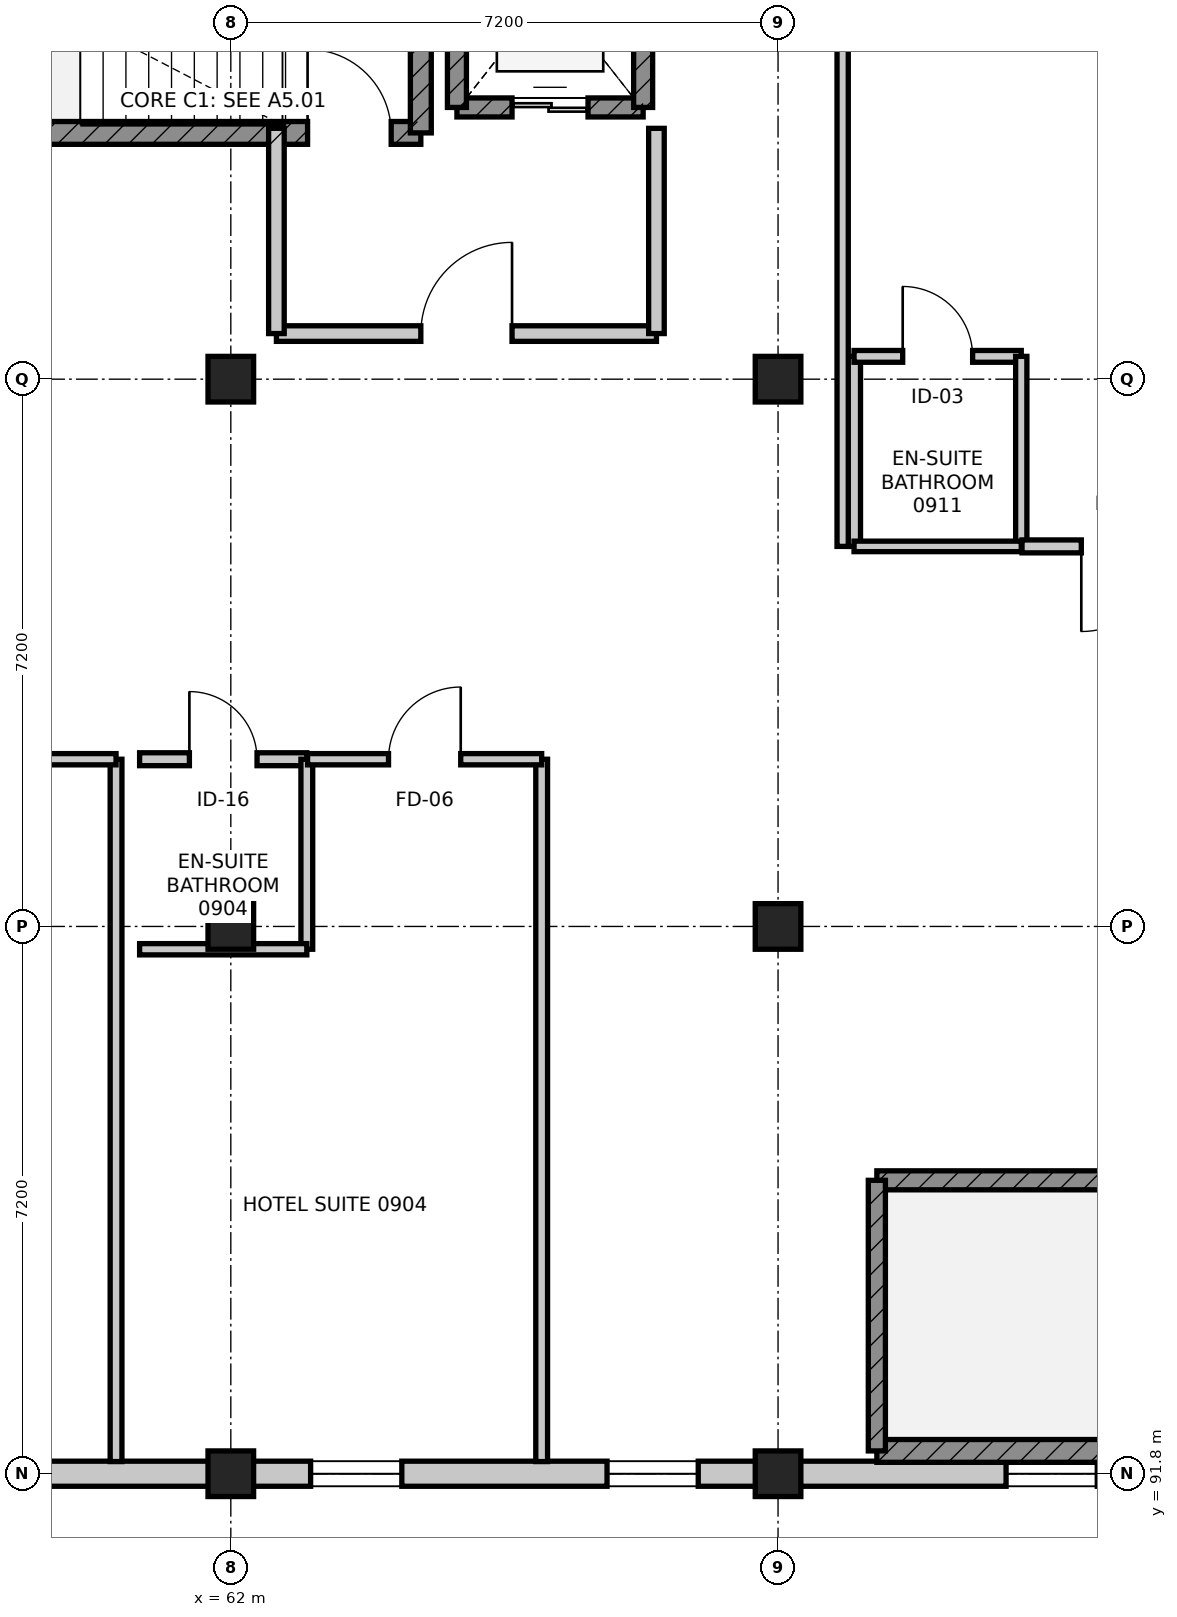
"""IFC4 building model, lengths in metres.
Left out: names, types, materials, properties, quantities, classifications, styles, units other than length and angle.
Written with IfcOpenShell. Run it as: python <this file> out.ifc"""

import sys

from ifc_helpers import new_model, si_unit, direction, frame, frame_2d, origin, origin_2d, place, context, subcontext, project, spatial, rectangle, extrude, element, fill, save


model = new_model("IFC4")
c1 = context("Model", 3, precision=1e-05, world=origin(), true_north=direction((0.0, 1.0)))
c2 = subcontext(c1, "Body", "Model", "MODEL_VIEW")
j1 = project(units=[si_unit("LENGTHUNIT", "METRE"), si_unit("PLANEANGLEUNIT", "RADIAN")], contexts=[c1])
p1 = place(None, origin())
s1 = spatial("IfcSite", under=j1, at=p1, CompositionType="ELEMENT")
p2 = place(p1, origin())
s2 = spatial("IfcBuilding", under=s1, at=p2, CompositionType="ELEMENT")
p3 = place(p2, frame((0.0, 0.0, 37.2)))
s3 = spatial("IfcBuildingStorey", under=s2, at=p3, CompositionType="ELEMENT", Elevation=37.2)
for number, where, z_axis, x_axis in (
    (1, (62.0, 91.8, 0.0), (0.0, 0.0, 1.0), (1.0, 0.0, 0.0)),
    (2, (62.0, 99.0, 0.0), (0.0, 0.0, 1.0), (1.0, 0.0, 0.0)),
    (3, (62.0, 106.2, 0.0), (0.0, 0.0, 1.0), (1.0, 0.0, 0.0)),
    (4, (69.2, 91.8, 0.0), (0.0, 0.0, 1.0), (1.0, 0.0, 0.0)),
    (5, (69.2, 99.0, 0.0), (0.0, 0.0, 1.0), (1.0, 0.0, 0.0)),
    (6, (69.2, 106.2, 0.0), (0.0, 0.0, 1.0), (1.0, 0.0, 0.0)),
):
    element("IfcColumn", number, at=place(p3, frame(where, z_axis=z_axis, x_axis=x_axis)), inside=s3, PredefinedType="COLUMN", context=c2, shape_type="SweptSolid", body=[
        extrude(rectangle(XDim=0.6, YDim=0.6, at=origin_2d()), origin(), (0.0, 0.0, 1.0), 3.6),
    ])
p4 = place(p3, frame((76.4, 91.8, 0.0), z_axis=(0.0, 0.0, 1.0), x_axis=(-1.0, 0.0, 0.0)))
e7 = element("IfcWall", 7, at=p4, inside=s3, PredefinedType="STANDARD", context=c2, shape_type="SweptSolid", body=[
    extrude(rectangle(XDim=7.2, YDim=0.33, at=frame_2d((3.6, 0.0))), origin(), (0.0, 0.0, 1.0), 3.38),
])
p5 = place(p4, frame((3.0, 0.0, 0.9)))
e8 = element("IfcOpeningElement", 8, at=p5, cuts=e7, PredefinedType="OPENING", context=c2, shape_type="SweptSolid", body=[
    extrude(rectangle(XDim=1.2, YDim=2.1, at=frame_2d((0.6, 1.05))), frame((0.0, 0.175, 0.0), z_axis=(0.0, -1.0, 0.0), x_axis=(1.0, 0.0, 0.0)), (0.0, 0.0, 1.0), 0.35),
])
p6 = place(p4, frame((1.05, 0.0, 0.85)))
e9 = element("IfcOpeningElement", 9, at=p6, cuts=e7, PredefinedType="OPENING", context=c2, shape_type="SweptSolid", body=[
    extrude(rectangle(XDim=1.2, YDim=1.8, at=frame_2d((0.6, 0.9))), frame((0.0, 0.175, 0.0), z_axis=(0.0, -1.0, 0.0), x_axis=(1.0, 0.0, 0.0)), (0.0, 0.0, 1.0), 0.35),
])
p7 = place(p3, frame((69.2, 91.8, 0.0), z_axis=(0.0, 0.0, 1.0), x_axis=(-1.0, 0.0, 0.0)))
e10 = element("IfcWall", 10, at=p7, inside=s3, PredefinedType="STANDARD", context=c2, shape_type="SweptSolid", body=[
    extrude(rectangle(XDim=7.2, YDim=0.33, at=frame_2d((3.6, 0.0))), origin(), (0.0, 0.0, 1.0), 2.765),
])
p8 = place(p7, frame((1.05, 0.0, 0.85)))
e11 = element("IfcOpeningElement", 11, at=p8, cuts=e10, PredefinedType="OPENING", context=c2, shape_type="SweptSolid", body=[
    extrude(rectangle(XDim=1.2, YDim=1.8, at=frame_2d((0.6, 0.9))), frame((0.0, 0.175, 0.0), z_axis=(0.0, -1.0, 0.0), x_axis=(1.0, 0.0, 0.0)), (0.0, 0.0, 1.0), 0.35),
])
p9 = place(p7, frame((4.95, 0.0, 0.85)))
e12 = element("IfcOpeningElement", 12, at=p9, cuts=e10, PredefinedType="OPENING", context=c2, shape_type="SweptSolid", body=[
    extrude(rectangle(XDim=1.2, YDim=1.8, at=frame_2d((0.6, 0.9))), frame((0.0, 0.175, 0.0), z_axis=(0.0, -1.0, 0.0), x_axis=(1.0, 0.0, 0.0)), (0.0, 0.0, 1.0), 0.35),
])
p10 = place(p3, frame((62.0, 91.8, 0.0), z_axis=(0.0, 0.0, 1.0), x_axis=(-1.0, 0.0, 0.0)))
e13 = element("IfcWall", 13, at=p10, inside=s3, PredefinedType="STANDARD", context=c2, shape_type="SweptSolid", body=[
    extrude(rectangle(XDim=7.2, YDim=0.33, at=frame_2d((3.6, 0.0))), origin(), (0.0, 0.0, 1.0), 2.765),
])
p11 = place(p10, frame((2.85, 0.0, 0.75)))
e14 = element("IfcOpeningElement", 14, at=p11, cuts=e13, PredefinedType="OPENING", context=c2, shape_type="SweptSolid", body=[
    extrude(rectangle(XDim=1.5, YDim=1.5, at=frame_2d((0.75, 0.75))), frame((0.0, 0.175, 0.0), z_axis=(0.0, -1.0, 0.0), x_axis=(1.0, 0.0, 0.0)), (0.0, 0.0, 1.0), 0.35),
])
p12 = place(p10, frame((4.95, 0.0, 0.85)))
e15 = element("IfcOpeningElement", 15, at=p12, cuts=e13, PredefinedType="OPENING", context=c2, shape_type="SweptSolid", body=[
    extrude(rectangle(XDim=1.2, YDim=1.8, at=frame_2d((0.6, 0.9))), frame((0.0, 0.175, 0.0), z_axis=(0.0, -1.0, 0.0), x_axis=(1.0, 0.0, 0.0)), (0.0, 0.0, 1.0), 0.35),
])
p13 = place(p3, frame((56.1, 109.44, 0.0), z_axis=(0.0, 0.0, 1.0), x_axis=(1.0, 0.0, 0.0)))
e16 = element("IfcWall", 16, at=p13, inside=s3, PredefinedType="SHEAR", context=c2, shape_type="SweptSolid", body=[
    extrude(rectangle(XDim=8.4, YDim=0.3, at=frame_2d((4.2, 0.0))), origin(), (0.0, 0.0, 1.0), 3.38),
])
p14 = place(p13, frame((6.91, 0.0, 0.0)))
e17 = element("IfcOpeningElement", 17, at=p14, cuts=e16, PredefinedType="OPENING", context=c2, shape_type="SweptSolid", body=[
    extrude(rectangle(XDim=1.1, YDim=2.1, at=frame_2d((0.55, 1.05))), frame((0.0, 0.16, 0.0), z_axis=(0.0, -1.0, 0.0), x_axis=(1.0, 0.0, 0.0)), (0.0, 0.0, 1.0), 0.32),
])
p15 = place(p3, frame((64.5, 109.44, 0.0), z_axis=(0.0, 0.0, 1.0), x_axis=(0.0, 1.0, 0.0)))
e18 = element("IfcWall", 18, at=p15, inside=s3, PredefinedType="SHEAR", context=c2, shape_type="SweptSolid", body=[
    extrude(rectangle(XDim=3.56, YDim=0.275, at=frame_2d((1.78, 0.0))), origin(), (0.0, 0.0, 1.0), 3.38),
])
p16 = place(p3, frame((70.5, 92.1, 0.0), z_axis=(0.0, 0.0, 1.0), x_axis=(1.0, 0.0, 0.0)))
e19 = element("IfcWall", 19, at=p16, inside=s3, PredefinedType="SHEAR", context=c2, shape_type="SweptSolid", body=[
    extrude(rectangle(XDim=8.4, YDim=0.3, at=frame_2d((4.2, 0.0))), origin(), (0.0, 0.0, 1.0), 3.38),
])
p17 = place(p3, frame((78.9, 95.66, 0.0), z_axis=(0.0, 0.0, 1.0), x_axis=(-1.0, 0.0, 0.0)))
e20 = element("IfcWall", 20, at=p17, inside=s3, PredefinedType="SHEAR", context=c2, shape_type="SweptSolid", body=[
    extrude(rectangle(XDim=8.4, YDim=0.25, at=frame_2d((4.2, 0.0))), origin(), (0.0, 0.0, 1.0), 3.38),
])
p18 = place(p17, frame((0.39, 0.0, 0.0)))
e21 = element("IfcOpeningElement", 21, at=p18, cuts=e20, PredefinedType="OPENING", context=c2, shape_type="SweptSolid", body=[
    extrude(rectangle(XDim=1.1, YDim=2.1, at=frame_2d((0.55, 1.05))), frame((0.0, 0.135, 0.0), z_axis=(0.0, -1.0, 0.0), x_axis=(1.0, 0.0, 0.0)), (0.0, 0.0, 1.0), 0.27),
])
p19 = place(p3, frame((70.5, 95.66, 0.0), z_axis=(0.0, 0.0, 1.0), x_axis=(0.0, -1.0, 0.0)))
e22 = element("IfcWall", 22, at=p19, inside=s3, PredefinedType="SHEAR", context=c2, shape_type="SweptSolid", body=[
    extrude(rectangle(XDim=3.56, YDim=0.225, at=frame_2d((1.78, 0.0))), origin(), (0.0, 0.0, 1.0), 3.38),
])
p20 = place(p3, frame((64.975, 109.775, 0.0), z_axis=(0.0, 0.0, 1.0), x_axis=(1.0, 0.0, 0.0)))
e23 = element("IfcWall", 23, at=p20, inside=s3, PredefinedType="SHEAR", context=c2, shape_type="SweptSolid", body=[
    extrude(rectangle(XDim=2.45, YDim=0.25, at=frame_2d((1.225, 0.0))), origin(), (0.0, 0.0, 1.0), 3.38),
])
p21 = place(p20, frame((0.725, 0.0, 0.0)))
e24 = element("IfcOpeningElement", 24, at=p21, cuts=e23, PredefinedType="OPENING", context=c2, shape_type="SweptSolid", body=[
    extrude(rectangle(XDim=1.0, YDim=2.15, at=frame_2d((0.5, 1.075))), frame((0.0, 0.135, 0.0), z_axis=(0.0, -1.0, 0.0), x_axis=(1.0, 0.0, 0.0)), (0.0, 0.0, 1.0), 0.27),
])
for number, where, z_axis, x_axis in (
    (25, (67.425, 109.775, 0.0), (0.0, 0.0, 1.0), (0.0, 1.0, 0.0)),
    (26, (64.975, 112.825, 0.0), (0.0, 0.0, 1.0), (0.0, -1.0, 0.0)),
):
    element("IfcWall", number, at=place(p3, frame(where, z_axis=z_axis, x_axis=x_axis)), inside=s3, PredefinedType="SHEAR", context=c2, shape_type="SweptSolid", body=[
        extrude(rectangle(XDim=3.05, YDim=0.25, at=frame_2d((1.525, 0.0))), origin(), (0.0, 0.0, 1.0), 3.38),
    ])
p22 = place(p3, frame((62.6, 106.8, 0.0), z_axis=(0.0, 0.0, 1.0), x_axis=(1.0, 0.0, 0.0)))
e27 = element("IfcWall", 27, at=p22, inside=s3, PredefinedType="PARTITIONING", context=c2, shape_type="SweptSolid", body=[
    extrude(rectangle(XDim=5.0, YDim=0.205, at=frame_2d((2.5, 0.0))), origin(), (0.0, 0.0, 1.0), 3.38),
])
p23 = place(p22, frame((1.9, 0.0, 0.0)))
e28 = element("IfcOpeningElement", 28, at=p23, cuts=e27, PredefinedType="OPENING", context=c2, shape_type="SweptSolid", body=[
    extrude(rectangle(XDim=1.2, YDim=2.1, at=frame_2d((0.6, 1.05))), frame((0.0, 0.113, 0.0), z_axis=(0.0, -1.0, 0.0), x_axis=(1.0, 0.0, 0.0)), (0.0, 0.0, 1.0), 0.225),
])
for number, where, z_axis, x_axis in (
    (29, (67.6, 106.8, 0.0), (0.0, 0.0, 1.0), (0.0, 1.0, 0.0)),
    (30, (62.6, 109.5, 0.0), (0.0, 0.0, 1.0), (0.0, -1.0, 0.0)),
):
    element("IfcWall", number, at=place(p3, frame(where, z_axis=z_axis, x_axis=x_axis)), inside=s3, PredefinedType="PARTITIONING", context=c2, shape_type="SweptSolid", body=[
        extrude(rectangle(XDim=2.7, YDim=0.205, at=frame_2d((1.35, 0.0))), origin(), (0.0, 0.0, 1.0), 3.38),
    ])
p24 = place(p3, frame((60.49, 101.2, 0.0), z_axis=(0.0, 0.0, 1.0), x_axis=(0.0, -1.0, 0.0)))
e31 = element("IfcWall", 31, at=p24, inside=s3, PredefinedType="PARTITIONING", context=c2, shape_type="SweptSolid", body=[
    extrude(rectangle(XDim=9.24, YDim=0.155, at=frame_2d((4.62, 0.0))), origin(), (0.0, 0.0, 1.0), 2.765),
])
p25 = place(p3, frame((57.41, 101.2, 0.0), z_axis=(0.0, 0.0, 1.0), x_axis=(1.0, 0.0, 0.0)))
e32 = element("IfcWall", 32, at=p25, inside=s3, PredefinedType="PARTITIONING", context=c2, shape_type="SweptSolid", body=[
    extrude(rectangle(XDim=3.08, YDim=0.148, at=frame_2d((1.54, 0.0))), origin(), (0.0, 0.0, 1.0), 3.38),
])
p26 = place(p25, frame((1.01, 0.0, 0.0)))
e33 = element("IfcOpeningElement", 33, at=p26, cuts=e32, PredefinedType="OPENING", context=c2, shape_type="SweptSolid", body=[
    extrude(rectangle(XDim=1.06, YDim=2.2, at=frame_2d((0.53, 1.1))), frame((0.0, 0.084, 0.0), z_axis=(0.0, -1.0, 0.0), x_axis=(1.0, 0.0, 0.0)), (0.0, 0.0, 1.0), 0.168),
])
p27 = place(p3, frame((60.8, 101.2, 0.0), z_axis=(0.0, 0.0, 1.0), x_axis=(1.0, 0.0, 0.0)))
e34 = element("IfcWall", 34, at=p27, inside=s3, PredefinedType="PARTITIONING", context=c2, shape_type="SweptSolid", body=[
    extrude(rectangle(XDim=2.2, YDim=0.17, at=frame_2d((1.1, 0.0))), origin(), (0.0, 0.0, 1.0), 2.715),
])
p28 = place(p27, frame((0.655, 0.0, 0.0)))
e35 = element("IfcOpeningElement", 35, at=p28, cuts=e34, PredefinedType="OPENING", context=c2, shape_type="SweptSolid", body=[
    extrude(rectangle(XDim=0.89, YDim=2.09, at=frame_2d((0.445, 1.045))), frame((0.0, 0.095, 0.0), z_axis=(0.0, -1.0, 0.0), x_axis=(1.0, 0.0, 0.0)), (0.0, 0.0, 1.0), 0.19),
])
p29 = place(p3, frame((63.0, 101.2, 0.0), z_axis=(0.0, 0.0, 1.0), x_axis=(0.0, -1.0, 0.0)))
e36 = element("IfcWall", 36, at=p29, inside=s3, PredefinedType="PARTITIONING", context=c2, shape_type="SweptSolid", body=[
    extrude(rectangle(XDim=2.5, YDim=0.155, at=frame_2d((1.25, 0.0))), origin(), (0.0, 0.0, 1.0), 2.765),
])
p30 = place(p3, frame((63.0, 98.7, 0.0), z_axis=(0.0, 0.0, 1.0), x_axis=(-1.0, 0.0, 0.0)))
e37 = element("IfcWall", 37, at=p30, inside=s3, PredefinedType="PARTITIONING", context=c2, shape_type="SweptSolid", body=[
    extrude(rectangle(XDim=2.2, YDim=0.148, at=frame_2d((1.1, 0.0))), origin(), (0.0, 0.0, 1.0), 2.715),
])
p31 = place(p3, frame((66.09, 101.2, 0.0), z_axis=(0.0, 0.0, 1.0), x_axis=(0.0, -1.0, 0.0)))
e38 = element("IfcWall", 38, at=p31, inside=s3, PredefinedType="PARTITIONING", context=c2, shape_type="SweptSolid", body=[
    extrude(rectangle(XDim=9.24, YDim=0.155, at=frame_2d((4.62, 0.0))), origin(), (0.0, 0.0, 1.0), 2.765),
])
p32 = place(p3, frame((63.01, 101.2, 0.0), z_axis=(0.0, 0.0, 1.0), x_axis=(1.0, 0.0, 0.0)))
e39 = element("IfcWall", 39, at=p32, inside=s3, PredefinedType="PARTITIONING", context=c2, shape_type="SweptSolid", body=[
    extrude(rectangle(XDim=3.08, YDim=0.148, at=frame_2d((1.54, 0.0))), origin(), (0.0, 0.0, 1.0), 3.38),
])
p33 = place(p32, frame((1.065, 0.0, 0.0)))
e40 = element("IfcOpeningElement", 40, at=p33, cuts=e39, PredefinedType="OPENING", context=c2, shape_type="SweptSolid", body=[
    extrude(rectangle(XDim=0.95, YDim=2.1, at=frame_2d((0.475, 1.05))), frame((0.0, 0.084, 0.0), z_axis=(0.0, -1.0, 0.0), x_axis=(1.0, 0.0, 0.0)), (0.0, 0.0, 1.0), 0.168),
])
p34 = place(p3, frame((70.2, 104.0, 0.0), z_axis=(0.0, 0.0, 1.0), x_axis=(0.0, 1.0, 0.0)))
e41 = element("IfcWall", 41, at=p34, inside=s3, PredefinedType="PARTITIONING", context=c2, shape_type="SweptSolid", body=[
    extrude(rectangle(XDim=2.5, YDim=0.17, at=frame_2d((1.25, 0.0))), origin(), (0.0, 0.0, 1.0), 2.765),
])
p35 = place(p3, frame((70.2, 106.5, 0.0), z_axis=(0.0, 0.0, 1.0), x_axis=(1.0, 0.0, 0.0)))
e42 = element("IfcWall", 42, at=p35, inside=s3, PredefinedType="PARTITIONING", context=c2, shape_type="SweptSolid", body=[
    extrude(rectangle(XDim=2.2, YDim=0.155, at=frame_2d((1.1, 0.0))), origin(), (0.0, 0.0, 1.0), 3.38),
])
p36 = place(p35, frame((0.64, 0.0, 0.0)))
e43 = element("IfcOpeningElement", 43, at=p36, cuts=e42, PredefinedType="OPENING", context=c2, shape_type="SweptSolid", body=[
    extrude(rectangle(XDim=0.92, YDim=2.1, at=frame_2d((0.46, 1.05))), frame((0.0, 0.087, 0.0), z_axis=(0.0, -1.0, 0.0), x_axis=(1.0, 0.0, 0.0)), (0.0, 0.0, 1.0), 0.175),
])
p37 = place(p3, frame((72.4, 106.5, 0.0), z_axis=(0.0, 0.0, 1.0), x_axis=(0.0, -1.0, 0.0)))
e44 = element("IfcWall", 44, at=p37, inside=s3, PredefinedType="PARTITIONING", context=c2, shape_type="SweptSolid", body=[
    extrude(rectangle(XDim=2.5, YDim=0.148, at=frame_2d((1.25, 0.0))), origin(), (0.0, 0.0, 1.0), 2.765),
])
p38 = place(p3, frame((72.4, 104.0, 0.0), z_axis=(0.0, 0.0, 1.0), x_axis=(-1.0, 0.0, 0.0)))
e45 = element("IfcWall", 45, at=p38, inside=s3, PredefinedType="PARTITIONING", context=c2, shape_type="SweptSolid", body=[
    extrude(rectangle(XDim=2.2, YDim=0.138, at=frame_2d((1.1, 0.0))), origin(), (0.0, 0.0, 1.0), 3.38),
])
p39 = place(p3, frame((70.05, 104.0, 0.0), z_axis=(0.0, 0.0, 1.0), x_axis=(0.0, 1.0, 0.0)))
e46 = element("IfcWall", 46, at=p39, inside=s3, PredefinedType="PARTITIONING", context=c2, shape_type="SweptSolid", body=[
    extrude(rectangle(XDim=11.177, YDim=0.148, at=frame_2d((5.589, 0.0))), origin(), (0.0, 0.0, 1.0), 2.765),
])
p40 = place(p3, frame((75.09, 104.0, 0.0), z_axis=(0.0, 0.0, 1.0), x_axis=(-1.0, 0.0, 0.0)))
e47 = element("IfcWall", 47, at=p40, inside=s3, PredefinedType="PARTITIONING", context=c2, shape_type="SweptSolid", body=[
    extrude(rectangle(XDim=2.68, YDim=0.17, at=frame_2d((1.34, 0.0))), origin(), (0.0, 0.0, 1.0), 3.38),
])
p41 = place(p40, frame((0.78, 0.0, 0.0)))
e48 = element("IfcOpeningElement", 48, at=p41, cuts=e47, PredefinedType="OPENING", context=c2, shape_type="SweptSolid", body=[
    extrude(rectangle(XDim=1.12, YDim=2.2, at=frame_2d((0.56, 1.1))), frame((0.0, 0.095, 0.0), z_axis=(0.0, -1.0, 0.0), x_axis=(1.0, 0.0, 0.0)), (0.0, 0.0, 1.0), 0.19),
])
p42 = place(p5, origin())
e49 = element("IfcWindow", 49, at=p42, inside=s3, PartitioningType="SINGLE_PANEL", PredefinedType="WINDOW", context=c2, shape_type="SweptSolid", body=[
    extrude(rectangle(XDim=1.2, YDim=2.1, at=frame_2d((0.6, 1.05))), frame((0.0, 0.03, 0.0), z_axis=(0.0, -1.0, 0.0), x_axis=(1.0, 0.0, 0.0)), (0.0, 0.0, 1.0), 0.06),
])
fill(e8, e49)
p43 = place(p8, origin())
e50 = element("IfcWindow", 50, at=p43, inside=s3, PartitioningType="SINGLE_PANEL", PredefinedType="WINDOW", context=c2, shape_type="SweptSolid", body=[
    extrude(rectangle(XDim=1.2, YDim=1.8, at=frame_2d((0.6, 0.9))), frame((0.0, 0.03, 0.0), z_axis=(0.0, -1.0, 0.0), x_axis=(1.0, 0.0, 0.0)), (0.0, 0.0, 1.0), 0.06),
])
fill(e11, e50)
p44 = place(p9, origin())
e51 = element("IfcWindow", 51, at=p44, inside=s3, PartitioningType="SINGLE_PANEL", PredefinedType="WINDOW", context=c2, shape_type="SweptSolid", body=[
    extrude(rectangle(XDim=1.2, YDim=1.8, at=frame_2d((0.6, 0.9))), frame((0.0, 0.03, 0.0), z_axis=(0.0, -1.0, 0.0), x_axis=(1.0, 0.0, 0.0)), (0.0, 0.0, 1.0), 0.06),
])
fill(e12, e51)
p45 = place(p14, origin())
e52 = element("IfcDoor", 52, at=p45, inside=s3, OperationType="SINGLE_SWING_LEFT", PredefinedType="DOOR", context=c2, shape_type="SweptSolid", body=[
    extrude(rectangle(XDim=1.1, YDim=2.1, at=frame_2d((0.55, 1.05))), frame((0.0, 0.025, 0.0), z_axis=(0.0, -1.0, 0.0), x_axis=(1.0, 0.0, 0.0)), (0.0, 0.0, 1.0), 0.05),
])
fill(e17, e52)
p46 = place(p21, origin())
e53 = element("IfcDoor", 53, at=p46, inside=s3, OperationType="DOUBLE_DOOR_SLIDING", PredefinedType="DOOR", context=c2, shape_type="SweptSolid", body=[
    extrude(rectangle(XDim=1.0, YDim=2.15, at=frame_2d((0.5, 1.075))), frame((0.0, 0.025, 0.0), z_axis=(0.0, -1.0, 0.0), x_axis=(1.0, 0.0, 0.0)), (0.0, 0.0, 1.0), 0.05),
])
fill(e24, e53)
p47 = place(p23, origin())
e54 = element("IfcDoor", 54, at=p47, inside=s3, OperationType="SINGLE_SWING_RIGHT", PredefinedType="DOOR", context=c2, shape_type="SweptSolid", body=[
    extrude(rectangle(XDim=1.2, YDim=2.1, at=frame_2d((0.6, 1.05))), frame((0.0, 0.025, 0.0), z_axis=(0.0, -1.0, 0.0), x_axis=(1.0, 0.0, 0.0)), (0.0, 0.0, 1.0), 0.05),
])
fill(e28, e54)
p48 = place(p28, origin())
e55 = element("IfcDoor", 55, at=p48, inside=s3, OperationType="SINGLE_SWING_LEFT", PredefinedType="DOOR", context=c2, shape_type="SweptSolid", body=[
    extrude(rectangle(XDim=0.89, YDim=2.09, at=frame_2d((0.445, 1.045))), frame((0.0, 0.025, 0.0), z_axis=(0.0, -1.0, 0.0), x_axis=(1.0, 0.0, 0.0)), (0.0, 0.0, 1.0), 0.05),
])
fill(e35, e55)
p49 = place(p33, origin())
e56 = element("IfcDoor", 56, at=p49, inside=s3, OperationType="SINGLE_SWING_RIGHT", PredefinedType="DOOR", context=c2, shape_type="SweptSolid", body=[
    extrude(rectangle(XDim=0.95, YDim=2.1, at=frame_2d((0.475, 1.05))), frame((0.0, 0.025, 0.0), z_axis=(0.0, -1.0, 0.0), x_axis=(1.0, 0.0, 0.0)), (0.0, 0.0, 1.0), 0.05),
])
fill(e40, e56)
p50 = place(p36, origin())
e57 = element("IfcDoor", 57, at=p50, inside=s3, OperationType="SINGLE_SWING_LEFT", PredefinedType="DOOR", context=c2, shape_type="SweptSolid", body=[
    extrude(rectangle(XDim=0.92, YDim=2.1, at=frame_2d((0.46, 1.05))), frame((0.0, 0.025, 0.0), z_axis=(0.0, -1.0, 0.0), x_axis=(1.0, 0.0, 0.0)), (0.0, 0.0, 1.0), 0.05),
])
fill(e43, e57)
p51 = place(p41, origin())
e58 = element("IfcDoor", 58, at=p51, inside=s3, OperationType="SINGLE_SWING_RIGHT", PredefinedType="DOOR", context=c2, shape_type="SweptSolid", body=[
    extrude(rectangle(XDim=1.12, YDim=2.2, at=frame_2d((0.56, 1.1))), frame((0.0, 0.025, 0.0), z_axis=(0.0, -1.0, 0.0), x_axis=(1.0, 0.0, 0.0)), (0.0, 0.0, 1.0), 0.05),
])
fill(e48, e58)
save(model, sys.argv[1])
